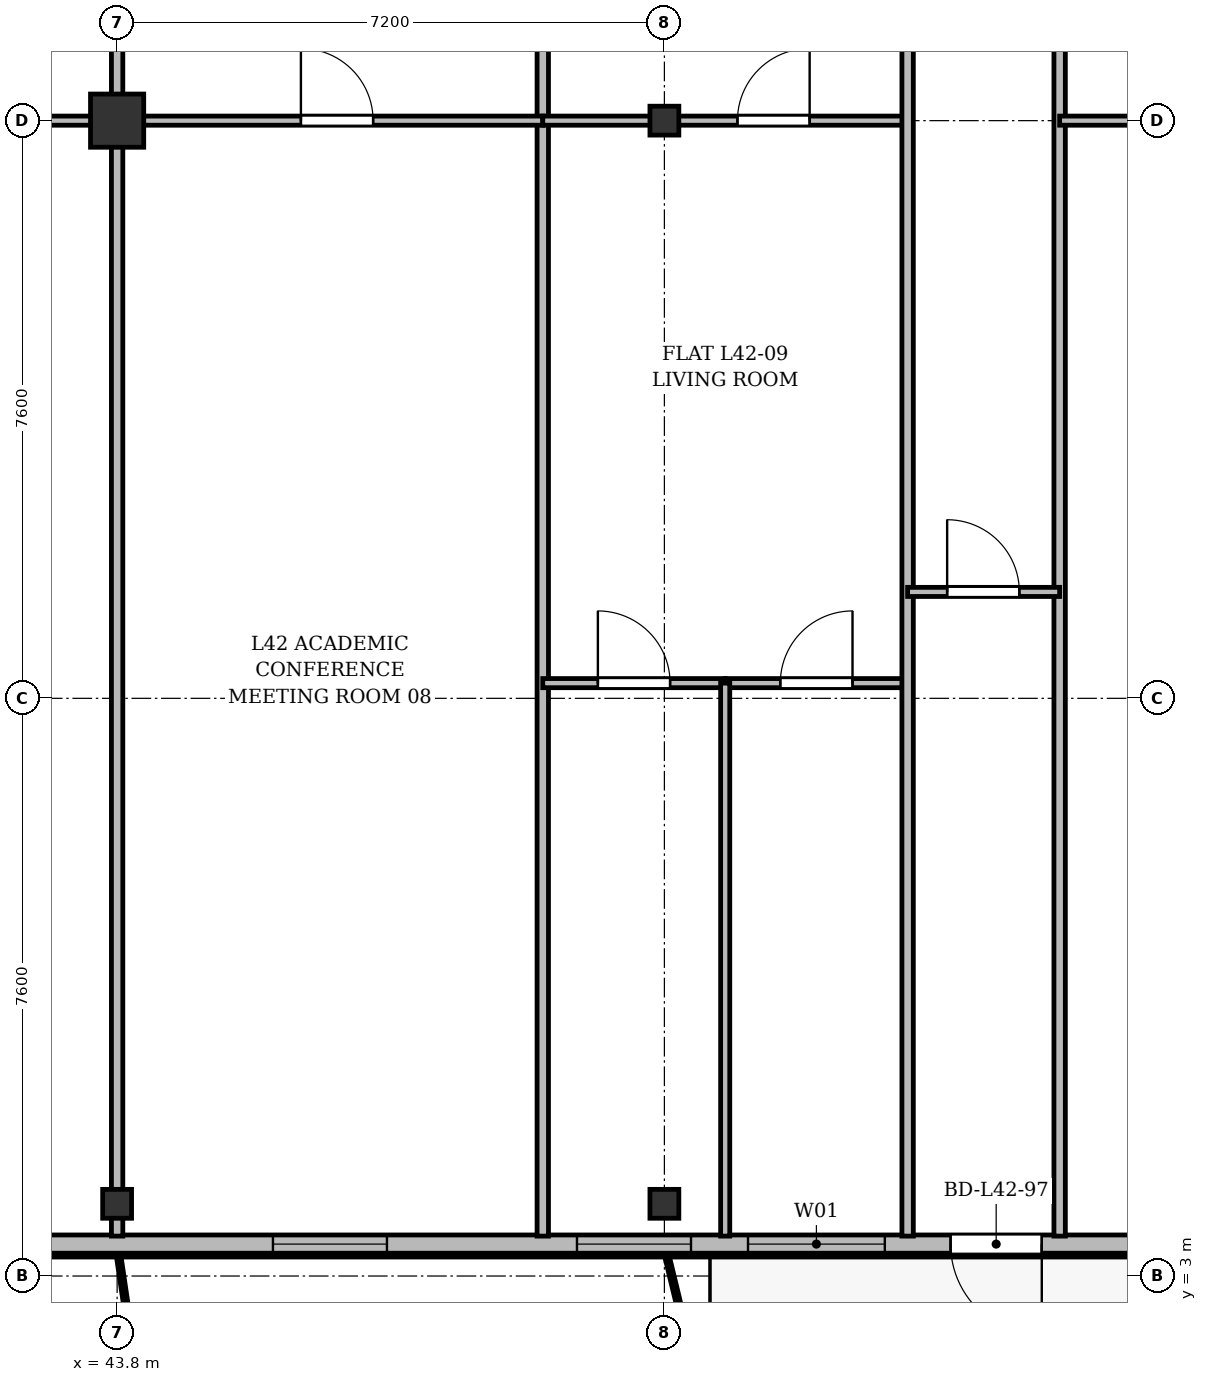
"""IFC4 building model, lengths in metres.
Left out: names, types, materials, properties, quantities, classifications, styles, units other than length and angle.
Written with IfcOpenShell. Run it as: python <this file> out.ifc"""

import sys

from ifc_helpers import new_model, si_unit, direction, frame, frame_2d, origin, origin_2d, place, context, subcontext, project, spatial, rectangle, i_section, extrude, source, transform, mapped, element, fill, save


model = new_model("IFC4")
c1 = context("Model", 3, precision=1e-05, world=origin(), true_north=direction((0.0, 1.0)))
c2 = subcontext(c1, "Body", "Model", "MODEL_VIEW")
j1 = project(units=[si_unit("LENGTHUNIT", "METRE"), si_unit("PLANEANGLEUNIT", "RADIAN")], contexts=[c1])
p1 = place(None, origin())
s1 = spatial("IfcSite", under=j1, at=p1, CompositionType="ELEMENT")
p2 = place(p1, origin())
s2 = spatial("IfcBuilding", under=s1, at=p2, CompositionType="ELEMENT")
p3 = place(p2, frame((0.0, 0.0, 160.9)))
s3 = spatial("IfcBuildingStorey", under=s2, at=p3, CompositionType="ELEMENT", Elevation=160.9)
m1 = source(origin(), c2, "Body", "SweptSolid", [
    extrude(i_section(OverallWidth=0.38, OverallDepth=0.38, WebThickness=0.02, FlangeThickness=0.03, at=origin_2d()), origin(), (0.0, 0.0, 1.0), 3.6),
])
p4 = place(p3, frame((43.8, 3.95, 0.0), z_axis=(0.0, 0.0, 1.0), x_axis=(1.0, 0.0, 0.0)))
e1 = element("IfcColumn", 1, at=p4, inside=s3, PredefinedType="COLUMN", context=c2, shape_type="MappedRepresentation", body=[
    mapped(m1, transform((0.0, 0.0, 0.0), x_axis=(1.0, 0.0, 0.0), y_axis=(0.0, 1.0, 0.0), z_axis=(0.0, 0.0, 1.0), scale=1.0)),
])
m2 = source(origin(), c2, "Body", "SweptSolid", [
    extrude(rectangle(XDim=0.7, YDim=0.7, at=origin_2d()), origin(), (0.0, 0.0, 1.0), 3.6),
])
p5 = place(p3, frame((43.8, 18.2, 0.0), z_axis=(0.0, 0.0, 1.0), x_axis=(1.0, 0.0, 0.0)))
e2 = element("IfcColumn", 2, at=p5, inside=s3, PredefinedType="COLUMN", context=c2, shape_type="MappedRepresentation", body=[
    mapped(m2, transform((0.0, 0.0, 0.0), x_axis=(1.0, 0.0, 0.0), y_axis=(0.0, 1.0, 0.0), z_axis=(0.0, 0.0, 1.0), scale=1.0)),
])
for number, where, z_axis, x_axis in (
    (3, (51.0, 3.95, 0.0), (0.0, 0.0, 1.0), (1.0, 0.0, 0.0)),
    (4, (51.0, 18.2, 0.0), (0.0, 0.0, 1.0), (1.0, 0.0, 0.0)),
):
    element("IfcColumn", number, at=place(p3, frame(where, z_axis=z_axis, x_axis=x_axis)), inside=s3, PredefinedType="COLUMN", context=c2, shape_type="MappedRepresentation", body=[
        mapped(m1, transform((0.0, 0.0, 0.0), x_axis=(1.0, 0.0, 0.0), y_axis=(0.0, 1.0, 0.0), z_axis=(0.0, 0.0, 1.0), scale=1.0)),
    ])
p6 = place(p3, frame((63.6, 3.42, 0.0), z_axis=(0.0, 0.0, 1.0), x_axis=(-1.0, 0.0, 0.0)))
e5 = element("IfcWall", 5, at=p6, inside=s3, PredefinedType="SOLIDWALL", context=c2, shape_type="SweptSolid", body=[
    extrude(rectangle(XDim=52.8, YDim=0.24, at=frame_2d((26.4, 0.0))), origin(), (0.0, 0.0, 1.0), 3.35),
])
p7 = place(p6, frame((0.295, 0.0, 0.9)))
e6 = element("IfcOpeningElement", 6, at=p7, cuts=e5, PredefinedType="OPENING", context=c2, shape_type="SweptSolid", body=[
    extrude(rectangle(XDim=1.5, YDim=1.75, at=frame_2d((0.75, 0.875))), frame((0.0, 0.13, 0.0), z_axis=(0.0, -1.0, 0.0), x_axis=(1.0, 0.0, 0.0)), (0.0, 0.0, 1.0), 0.26),
])
p8 = place(p6, frame((3.7, 0.0, 0.9)))
e7 = element("IfcOpeningElement", 7, at=p8, cuts=e5, PredefinedType="OPENING", context=c2, shape_type="SweptSolid", body=[
    extrude(rectangle(XDim=2.0, YDim=1.95, at=frame_2d((1.0, 0.975))), frame((0.0, 0.13, 0.0), z_axis=(0.0, -1.0, 0.0), x_axis=(1.0, 0.0, 0.0)), (0.0, 0.0, 1.0), 0.26),
])
p9 = place(p6, frame((7.635, 0.0, 0.0)))
e8 = element("IfcOpeningElement", 8, at=p9, cuts=e5, PredefinedType="OPENING", context=c2, shape_type="SweptSolid", body=[
    extrude(rectangle(XDim=1.2, YDim=2.2, at=frame_2d((0.6, 1.1))), frame((0.0, 0.13, 0.0), z_axis=(0.0, -1.0, 0.0), x_axis=(1.0, 0.0, 0.0)), (0.0, 0.0, 1.0), 0.26),
])
p10 = place(p6, frame((9.7, 0.0, 0.9)))
e9 = element("IfcOpeningElement", 9, at=p10, cuts=e5, PredefinedType="OPENING", context=c2, shape_type="SweptSolid", body=[
    extrude(rectangle(XDim=1.8, YDim=1.8, at=frame_2d((0.9, 0.9))), frame((0.0, 0.13, 0.0), z_axis=(0.0, -1.0, 0.0), x_axis=(1.0, 0.0, 0.0)), (0.0, 0.0, 1.0), 0.26),
])
p11 = place(p6, frame((12.25, 0.0, 0.9)))
e10 = element("IfcOpeningElement", 10, at=p11, cuts=e5, PredefinedType="OPENING", context=c2, shape_type="SweptSolid", body=[
    extrude(rectangle(XDim=1.5, YDim=1.75, at=frame_2d((0.75, 0.875))), frame((0.0, 0.13, 0.0), z_axis=(0.0, -1.0, 0.0), x_axis=(1.0, 0.0, 0.0)), (0.0, 0.0, 1.0), 0.26),
])
p12 = place(p6, frame((16.25, 0.0, 0.9)))
e11 = element("IfcOpeningElement", 11, at=p12, cuts=e5, PredefinedType="OPENING", context=c2, shape_type="SweptSolid", body=[
    extrude(rectangle(XDim=1.5, YDim=1.75, at=frame_2d((0.75, 0.875))), frame((0.0, 0.13, 0.0), z_axis=(0.0, -1.0, 0.0), x_axis=(1.0, 0.0, 0.0)), (0.0, 0.0, 1.0), 0.26),
])
p13 = place(p6, frame((22.4, 0.0, 0.9)))
e12 = element("IfcOpeningElement", 12, at=p13, cuts=e5, PredefinedType="OPENING", context=c2, shape_type="SweptSolid", body=[
    extrude(rectangle(XDim=2.0, YDim=1.95, at=frame_2d((1.0, 0.975))), frame((0.0, 0.13, 0.0), z_axis=(0.0, -1.0, 0.0), x_axis=(1.0, 0.0, 0.0)), (0.0, 0.0, 1.0), 0.26),
])
p14 = place(p6, frame((27.675, 0.0, 0.9)))
e13 = element("IfcOpeningElement", 13, at=p14, cuts=e5, PredefinedType="OPENING", context=c2, shape_type="SweptSolid", body=[
    extrude(rectangle(XDim=1.65, YDim=1.85, at=frame_2d((0.825, 0.925))), frame((0.0, 0.13, 0.0), z_axis=(0.0, -1.0, 0.0), x_axis=(1.0, 0.0, 0.0)), (0.0, 0.0, 1.0), 0.26),
])
p15 = place(p6, frame((30.6, 0.0, 0.9)))
e14 = element("IfcOpeningElement", 14, at=p15, cuts=e5, PredefinedType="OPENING", context=c2, shape_type="SweptSolid", body=[
    extrude(rectangle(XDim=1.8, YDim=1.8, at=frame_2d((0.9, 0.9))), frame((0.0, 0.13, 0.0), z_axis=(0.0, -1.0, 0.0), x_axis=(1.0, 0.0, 0.0)), (0.0, 0.0, 1.0), 0.26),
])
p16 = place(p6, frame((34.1, 0.0, 0.9)))
e15 = element("IfcOpeningElement", 15, at=p16, cuts=e5, PredefinedType="OPENING", context=c2, shape_type="SweptSolid", body=[
    extrude(rectangle(XDim=2.2, YDim=1.8, at=frame_2d((1.1, 0.9))), frame((0.0, 0.13, 0.0), z_axis=(0.0, -1.0, 0.0), x_axis=(1.0, 0.0, 0.0)), (0.0, 0.0, 1.0), 0.26),
])
p17 = place(p6, frame((39.65, 0.0, 0.9)))
e16 = element("IfcOpeningElement", 16, at=p17, cuts=e5, PredefinedType="OPENING", context=c2, shape_type="SweptSolid", body=[
    extrude(rectangle(XDim=1.5, YDim=1.75, at=frame_2d((0.75, 0.875))), frame((0.0, 0.13, 0.0), z_axis=(0.0, -1.0, 0.0), x_axis=(1.0, 0.0, 0.0)), (0.0, 0.0, 1.0), 0.26),
])
p18 = place(p6, frame((43.65, 0.0, 0.9)))
e17 = element("IfcOpeningElement", 17, at=p18, cuts=e5, PredefinedType="OPENING", context=c2, shape_type="SweptSolid", body=[
    extrude(rectangle(XDim=1.5, YDim=1.75, at=frame_2d((0.75, 0.875))), frame((0.0, 0.13, 0.0), z_axis=(0.0, -1.0, 0.0), x_axis=(1.0, 0.0, 0.0)), (0.0, 0.0, 1.0), 0.26),
])
p19 = place(p6, frame((47.275, 0.0, 0.9)))
e18 = element("IfcOpeningElement", 18, at=p19, cuts=e5, PredefinedType="OPENING", context=c2, shape_type="SweptSolid", body=[
    extrude(rectangle(XDim=1.65, YDim=1.85, at=frame_2d((0.825, 0.925))), frame((0.0, 0.13, 0.0), z_axis=(0.0, -1.0, 0.0), x_axis=(1.0, 0.0, 0.0)), (0.0, 0.0, 1.0), 0.26),
])
p20 = place(p6, frame((51.005, 0.0, 0.9)))
e19 = element("IfcOpeningElement", 19, at=p20, cuts=e5, PredefinedType="OPENING", context=c2, shape_type="SweptSolid", body=[
    extrude(rectangle(XDim=1.5, YDim=1.75, at=frame_2d((0.75, 0.875))), frame((0.0, 0.13, 0.0), z_axis=(0.0, -1.0, 0.0), x_axis=(1.0, 0.0, 0.0)), (0.0, 0.0, 1.0), 0.26),
])
p21 = place(p6, frame((37.85, 0.0, 0.0)))
e20 = element("IfcOpeningElement", 20, at=p21, cuts=e5, PredefinedType="OPENING", context=c2, shape_type="SweptSolid", body=[
    extrude(rectangle(XDim=1.2, YDim=2.2, at=frame_2d((0.6, 1.1))), frame((0.0, 0.13, 0.0), z_axis=(0.0, -1.0, 0.0), x_axis=(1.0, 0.0, 0.0)), (0.0, 0.0, 1.0), 0.26),
])
p22 = place(p3, frame((43.8, 3.525, 0.0), z_axis=(0.0, 0.0, 1.0), x_axis=(0.0, 1.0, 0.0)))
e21 = element("IfcWall", 21, at=p22, inside=s3, PredefinedType="PARTITIONING", context=c2, shape_type="SweptSolid", body=[
    extrude(rectangle(XDim=27.275, YDim=0.15, at=frame_2d((13.638, 0.0))), origin(), (0.0, 0.0, 1.0), 2.85),
])
p23 = place(p3, frame((49.4, 3.525, 0.0), z_axis=(0.0, 0.0, 1.0), x_axis=(0.0, 1.0, 0.0)))
e22 = element("IfcWall", 22, at=p23, inside=s3, PredefinedType="PARTITIONING", context=c2, shape_type="SweptSolid", body=[
    extrude(rectangle(XDim=27.275, YDim=0.15, at=frame_2d((13.638, 0.0))), origin(), (0.0, 0.0, 1.0), 2.75),
])
p24 = place(p3, frame((36.6, 18.2, 0.0), z_axis=(0.0, 0.0, 1.0), x_axis=(1.0, 0.0, 0.0)))
e23 = element("IfcWall", 23, at=p24, inside=s3, PredefinedType="PARTITIONING", context=c2, shape_type="SweptSolid", body=[
    extrude(rectangle(XDim=7.2, YDim=0.12, at=frame_2d((3.6, 0.0))), origin(), (0.0, 0.0, 1.0), 2.75),
])
p25 = place(p24, frame((3.125, 0.0, 0.0)))
e24 = element("IfcOpeningElement", 24, at=p25, cuts=e23, PredefinedType="OPENING", context=c2, shape_type="SweptSolid", body=[
    extrude(rectangle(XDim=0.95, YDim=2.15, at=frame_2d((0.475, 1.075))), frame((0.0, 0.07, 0.0), z_axis=(0.0, -1.0, 0.0), x_axis=(1.0, 0.0, 0.0)), (0.0, 0.0, 1.0), 0.14),
])
p26 = place(p3, frame((43.8, 18.2, 0.0), z_axis=(0.0, 0.0, 1.0), x_axis=(1.0, 0.0, 0.0)))
e25 = element("IfcWall", 25, at=p26, inside=s3, PredefinedType="PARTITIONING", context=c2, shape_type="SweptSolid", body=[
    extrude(rectangle(XDim=5.6, YDim=0.12, at=frame_2d((2.8, 0.0))), origin(), (0.0, 0.0, 1.0), 2.75),
])
p27 = place(p26, frame((2.418, 0.0, 0.0)))
e26 = element("IfcOpeningElement", 26, at=p27, cuts=e25, PredefinedType="OPENING", context=c2, shape_type="SweptSolid", body=[
    extrude(rectangle(XDim=0.95, YDim=2.15, at=frame_2d((0.475, 1.075))), frame((0.0, 0.07, 0.0), z_axis=(0.0, -1.0, 0.0), x_axis=(1.0, 0.0, 0.0)), (0.0, 0.0, 1.0), 0.14),
])
p28 = place(p3, frame((49.4, 18.2, 0.0), z_axis=(0.0, 0.0, 1.0), x_axis=(1.0, 0.0, 0.0)))
e27 = element("IfcWall", 27, at=p28, inside=s3, PredefinedType="PARTITIONING", context=c2, shape_type="SweptSolid", body=[
    extrude(rectangle(XDim=4.8, YDim=0.12, at=frame_2d((2.4, 0.0))), origin(), (0.0, 0.0, 1.0), 2.75),
])
p29 = place(p28, frame((2.561, 0.0, 0.0)))
e28 = element("IfcOpeningElement", 28, at=p29, cuts=e27, PredefinedType="OPENING", context=c2, shape_type="SweptSolid", body=[
    extrude(rectangle(XDim=0.95, YDim=2.15, at=frame_2d((0.475, 1.075))), frame((0.0, 0.07, 0.0), z_axis=(0.0, -1.0, 0.0), x_axis=(1.0, 0.0, 0.0)), (0.0, 0.0, 1.0), 0.14),
])
p30 = place(p3, frame((49.4, 10.8, 0.0), z_axis=(0.0, 0.0, 1.0), x_axis=(1.0, 0.0, 0.0)))
e29 = element("IfcWall", 29, at=p30, inside=s3, PredefinedType="PARTITIONING", context=c2, shape_type="SweptSolid", body=[
    extrude(rectangle(XDim=2.4, YDim=0.12, at=frame_2d((1.2, 0.0))), origin(), (0.0, 0.0, 1.0), 2.85),
])
p31 = place(p30, frame((0.725, 0.0, 0.0)))
e30 = element("IfcOpeningElement", 30, at=p31, cuts=e29, PredefinedType="OPENING", context=c2, shape_type="SweptSolid", body=[
    extrude(rectangle(XDim=0.95, YDim=2.15, at=frame_2d((0.475, 1.075))), frame((0.0, 0.07, 0.0), z_axis=(0.0, -1.0, 0.0), x_axis=(1.0, 0.0, 0.0)), (0.0, 0.0, 1.0), 0.14),
])
p32 = place(p3, frame((51.8, 10.8, 0.0), z_axis=(0.0, 0.0, 1.0), x_axis=(1.0, 0.0, 0.0)))
e31 = element("IfcWall", 31, at=p32, inside=s3, PredefinedType="PARTITIONING", context=c2, shape_type="SweptSolid", body=[
    extrude(rectangle(XDim=2.4, YDim=0.12, at=frame_2d((1.2, 0.0))), origin(), (0.0, 0.0, 1.0), 3.35),
])
p33 = place(p32, frame((0.725, 0.0, 0.0)))
e32 = element("IfcOpeningElement", 32, at=p33, cuts=e31, PredefinedType="OPENING", context=c2, shape_type="SweptSolid", body=[
    extrude(rectangle(XDim=0.95, YDim=2.15, at=frame_2d((0.475, 1.075))), frame((0.0, 0.07, 0.0), z_axis=(0.0, -1.0, 0.0), x_axis=(1.0, 0.0, 0.0)), (0.0, 0.0, 1.0), 0.14),
])
p34 = place(p3, frame((51.8, 3.525, 0.0), z_axis=(0.0, 0.0, 1.0), x_axis=(0.0, 1.0, 0.0)))
e33 = element("IfcWall", 33, at=p34, inside=s3, PredefinedType="PARTITIONING", context=c2, shape_type="SweptSolid", body=[
    extrude(rectangle(XDim=7.275, YDim=0.12, at=frame_2d((3.638, 0.0))), origin(), (0.0, 0.0, 1.0), 2.75),
])
for number, where, z_axis, x_axis in (
    (34, (54.2, 3.525, 0.0), (0.0, 0.0, 1.0), (0.0, 1.0, 0.0)),
    (35, (56.2, 3.525, 0.0), (0.0, 0.0, 1.0), (0.0, 1.0, 0.0)),
):
    element("IfcWall", number, at=place(p3, frame(where, z_axis=z_axis, x_axis=x_axis)), inside=s3, PredefinedType="PARTITIONING", context=c2, shape_type="SweptSolid", body=[
        extrude(rectangle(XDim=27.275, YDim=0.15, at=frame_2d((13.638, 0.0))), origin(), (0.0, 0.0, 1.0), 2.75),
    ])
p35 = place(p3, frame((54.2, 12.0, 0.0), z_axis=(0.0, 0.0, 1.0), x_axis=(1.0, 0.0, 0.0)))
e36 = element("IfcWall", 36, at=p35, inside=s3, PredefinedType="PARTITIONING", context=c2, shape_type="SweptSolid", body=[
    extrude(rectangle(XDim=2.0, YDim=0.12, at=frame_2d((1.0, 0.0))), origin(), (0.0, 0.0, 1.0), 3.35),
])
p36 = place(p35, frame((0.52, 0.0, 0.0)))
e37 = element("IfcOpeningElement", 37, at=p36, cuts=e36, PredefinedType="OPENING", context=c2, shape_type="SweptSolid", body=[
    extrude(rectangle(XDim=0.95, YDim=2.15, at=frame_2d((0.475, 1.075))), frame((0.0, 0.07, 0.0), z_axis=(0.0, -1.0, 0.0), x_axis=(1.0, 0.0, 0.0)), (0.0, 0.0, 1.0), 0.14),
])
p37 = place(p3, frame((56.2, 18.2, 0.0), z_axis=(0.0, 0.0, 1.0), x_axis=(1.0, 0.0, 0.0)))
e38 = element("IfcWall", 38, at=p37, inside=s3, PredefinedType="PARTITIONING", context=c2, shape_type="SweptSolid", body=[
    extrude(rectangle(XDim=5.4, YDim=0.12, at=frame_2d((2.7, 0.0))), origin(), (0.0, 0.0, 1.0), 2.75),
])
p38 = place(p37, frame((3.701, 0.0, 0.0)))
e39 = element("IfcOpeningElement", 39, at=p38, cuts=e38, PredefinedType="OPENING", context=c2, shape_type="SweptSolid", body=[
    extrude(rectangle(XDim=0.95, YDim=2.15, at=frame_2d((0.475, 1.075))), frame((0.0, 0.07, 0.0), z_axis=(0.0, -1.0, 0.0), x_axis=(1.0, 0.0, 0.0)), (0.0, 0.0, 1.0), 0.14),
])
m3 = source(origin(), c2, "Body", "SweptSolid", [
    extrude(rectangle(XDim=1.2, YDim=2.2, at=frame_2d((0.6, 1.1))), frame((0.0, 0.025, 0.0), z_axis=(0.0, -1.0, 0.0), x_axis=(1.0, 0.0, 0.0)), (0.0, 0.0, 1.0), 0.05),
])
p39 = place(p9, origin())
e40 = element("IfcDoor", 40, at=p39, inside=s3, OperationType="SINGLE_SWING_LEFT", PredefinedType="DOOR", context=c2, shape_type="MappedRepresentation", body=[
    mapped(m3, transform((0.0, 0.0, 0.0), x_axis=(1.0, 0.0, 0.0), y_axis=(0.0, 1.0, 0.0), z_axis=(0.0, 0.0, 1.0), scale=1.0)),
])
fill(e8, e40)
m4 = source(origin(), c2, "Body", "SweptSolid", [
    extrude(rectangle(XDim=1.8, YDim=1.8, at=frame_2d((0.9, 0.9))), frame((0.0, 0.03, 0.0), z_axis=(0.0, -1.0, 0.0), x_axis=(1.0, 0.0, 0.0)), (0.0, 0.0, 1.0), 0.06),
])
p40 = place(p10, origin())
e41 = element("IfcWindow", 41, at=p40, inside=s3, PartitioningType="SINGLE_PANEL", PredefinedType="WINDOW", context=c2, shape_type="MappedRepresentation", body=[
    mapped(m4, transform((0.0, 0.0, 0.0), x_axis=(1.0, 0.0, 0.0), y_axis=(0.0, 1.0, 0.0), z_axis=(0.0, 0.0, 1.0), scale=1.0)),
])
fill(e9, e41)
m5 = source(origin(), c2, "Body", "SweptSolid", [
    extrude(rectangle(XDim=1.5, YDim=1.75, at=frame_2d((0.75, 0.875))), frame((0.0, 0.03, 0.0), z_axis=(0.0, -1.0, 0.0), x_axis=(1.0, 0.0, 0.0)), (0.0, 0.0, 1.0), 0.06),
])
p41 = place(p11, origin())
e42 = element("IfcWindow", 42, at=p41, inside=s3, PartitioningType="SINGLE_PANEL", PredefinedType="WINDOW", context=c2, shape_type="MappedRepresentation", body=[
    mapped(m5, transform((0.0, 0.0, 0.0), x_axis=(1.0, 0.0, 0.0), y_axis=(0.0, 1.0, 0.0), z_axis=(0.0, 0.0, 1.0), scale=1.0)),
])
fill(e10, e42)
p42 = place(p12, origin())
e43 = element("IfcWindow", 43, at=p42, inside=s3, PartitioningType="SINGLE_PANEL", PredefinedType="WINDOW", context=c2, shape_type="MappedRepresentation", body=[
    mapped(m5, transform((0.0, 0.0, 0.0), x_axis=(1.0, 0.0, 0.0), y_axis=(0.0, 1.0, 0.0), z_axis=(0.0, 0.0, 1.0), scale=1.0)),
])
fill(e11, e43)
m6 = source(origin(), c2, "Body", "SweptSolid", [
    extrude(rectangle(XDim=0.95, YDim=2.15, at=frame_2d((0.475, 1.075))), frame((0.0, 0.025, 0.0), z_axis=(0.0, -1.0, 0.0), x_axis=(1.0, 0.0, 0.0)), (0.0, 0.0, 1.0), 0.05),
])
p43 = place(p27, origin())
e44 = element("IfcDoor", 44, at=p43, inside=s3, OperationType="SINGLE_SWING_LEFT", PredefinedType="DOOR", context=c2, shape_type="MappedRepresentation", body=[
    mapped(m6, transform((0.0, 0.0, 0.0), x_axis=(1.0, 0.0, 0.0), y_axis=(0.0, 1.0, 0.0), z_axis=(0.0, 0.0, 1.0), scale=1.0)),
])
fill(e26, e44)
p44 = place(p29, origin())
e45 = element("IfcDoor", 45, at=p44, inside=s3, OperationType="SINGLE_SWING_RIGHT", PredefinedType="DOOR", context=c2, shape_type="MappedRepresentation", body=[
    mapped(m6, transform((0.0, 0.0, 0.0), x_axis=(1.0, 0.0, 0.0), y_axis=(0.0, 1.0, 0.0), z_axis=(0.0, 0.0, 1.0), scale=1.0)),
])
fill(e28, e45)
p45 = place(p31, origin())
e46 = element("IfcDoor", 46, at=p45, inside=s3, OperationType="SINGLE_SWING_LEFT", PredefinedType="DOOR", context=c2, shape_type="MappedRepresentation", body=[
    mapped(m6, transform((0.0, 0.0, 0.0), x_axis=(1.0, 0.0, 0.0), y_axis=(0.0, 1.0, 0.0), z_axis=(0.0, 0.0, 1.0), scale=1.0)),
])
fill(e30, e46)
p46 = place(p33, origin())
e47 = element("IfcDoor", 47, at=p46, inside=s3, OperationType="SINGLE_SWING_RIGHT", PredefinedType="DOOR", context=c2, shape_type="MappedRepresentation", body=[
    mapped(m6, transform((0.0, 0.0, 0.0), x_axis=(1.0, 0.0, 0.0), y_axis=(0.0, 1.0, 0.0), z_axis=(0.0, 0.0, 1.0), scale=1.0)),
])
fill(e32, e47)
p47 = place(p36, origin())
e48 = element("IfcDoor", 48, at=p47, inside=s3, OperationType="SINGLE_SWING_LEFT", PredefinedType="DOOR", context=c2, shape_type="MappedRepresentation", body=[
    mapped(m6, transform((0.0, 0.0, 0.0), x_axis=(1.0, 0.0, 0.0), y_axis=(0.0, 1.0, 0.0), z_axis=(0.0, 0.0, 1.0), scale=1.0)),
])
fill(e37, e48)
save(model, sys.argv[1])
